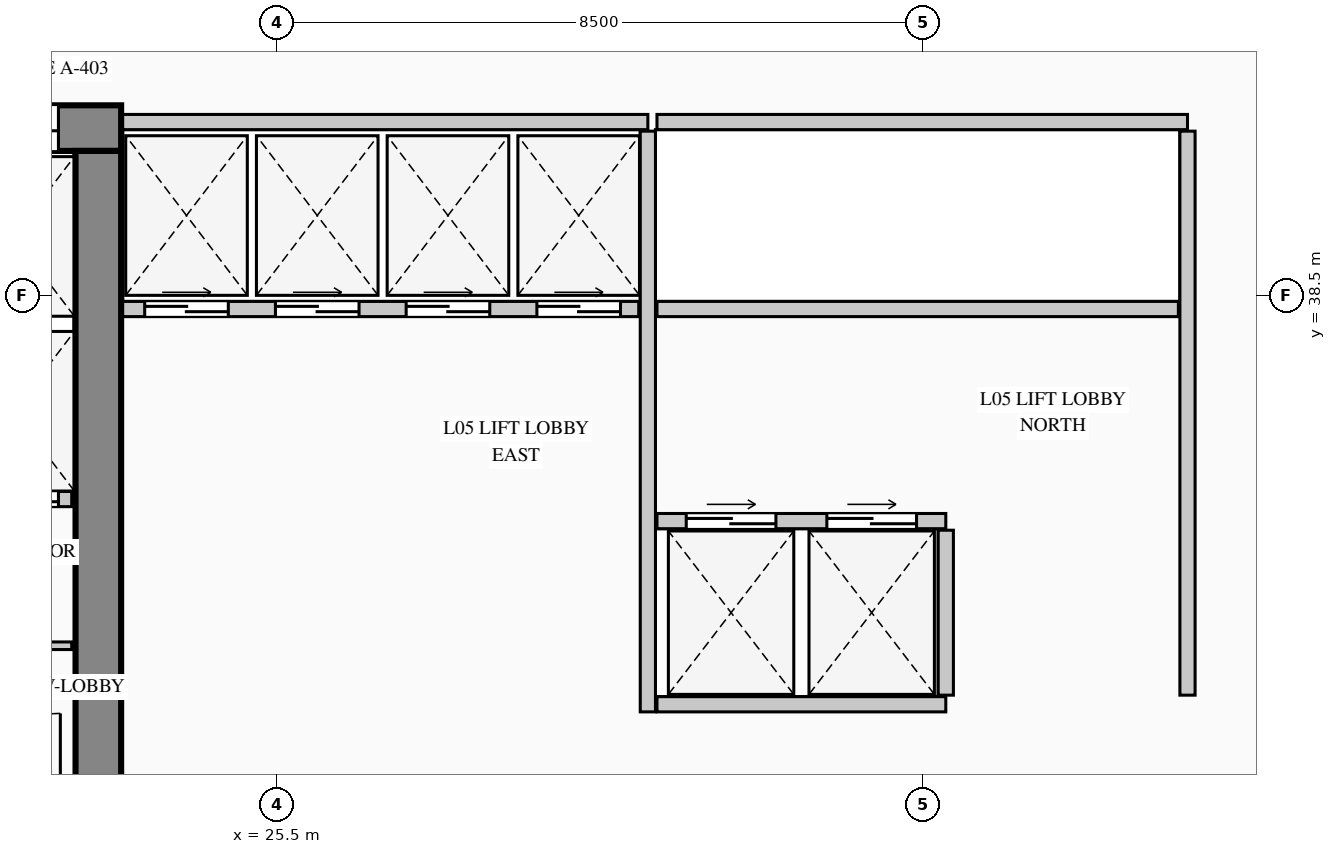
"""IFC4 building model, lengths in metres.
Left out: names, types, materials, properties, quantities, classifications, styles, units other than length and angle.
Written with IfcOpenShell. Run it as: python <this file> out.ifc"""

import sys

from ifc_helpers import new_model, si_unit, direction, frame, frame_2d, origin, place, context, subcontext, project, spatial, rectangle, extrude, element, fill, save


model = new_model("IFC4")
c1 = context("Model", 3, precision=1e-05, world=origin(), true_north=direction((0.0, 1.0)))
c2 = subcontext(c1, "Body", "Model", "MODEL_VIEW")
j1 = project(units=[si_unit("LENGTHUNIT", "METRE"), si_unit("PLANEANGLEUNIT", "RADIAN")], contexts=[c1])
p1 = place(None, origin())
s1 = spatial("IfcSite", under=j1, at=p1, CompositionType="ELEMENT")
p2 = place(p1, origin())
s2 = spatial("IfcBuilding", under=s1, at=p2, CompositionType="ELEMENT")
p3 = place(p2, frame((0.0, 0.0, 21.6)))
s3 = spatial("IfcBuildingStorey", under=s2, at=p3, CompositionType="ELEMENT", Elevation=21.6)
p4 = place(p3, frame((5.4, 40.7, 0.0), z_axis=(0.0, 0.0, 1.0), x_axis=(1.0, 0.0, 0.0)))
e1 = element("IfcWall", 1, at=p4, inside=s3, PredefinedType="SHEAR", context=c2, shape_type="SweptSolid", body=[
    extrude(rectangle(XDim=18.05, YDim=0.6, at=frame_2d((9.025, 0.0))), origin(), (0.0, 0.0, 1.0), 5.4),
])
p5 = place(p4, frame((16.045, 0.0, 0.0)))
e2 = element("IfcOpeningElement", 2, at=p5, cuts=e1, PredefinedType="OPENING", context=c2, shape_type="SweptSolid", body=[
    extrude(rectangle(XDim=1.18, YDim=2.25, at=frame_2d((0.59, 1.125))), frame((0.0, 0.31, 0.0), z_axis=(0.0, -1.0, 0.0), x_axis=(1.0, 0.0, 0.0)), (0.0, 0.0, 1.0), 0.62),
])
p6 = place(p3, frame((23.15, 32.1, 0.0), z_axis=(0.0, 0.0, 1.0), x_axis=(0.0, 1.0, 0.0)))
e3 = element("IfcWall", 3, at=p6, inside=s3, PredefinedType="SHEAR", context=c2, shape_type="SweptSolid", body=[
    extrude(rectangle(XDim=8.3, YDim=0.6, at=frame_2d((4.15, 0.0))), origin(), (0.0, 0.0, 1.0), 5.4),
])
p7 = place(p3, frame((21.38, 33.89, 0.0), z_axis=(0.0, 0.0, 1.0), x_axis=(1.0, 0.0, 0.0)))
e4 = element("IfcWall", 4, at=p7, inside=s3, PredefinedType="PARTITIONING", context=c2, shape_type="SweptSolid", body=[
    extrude(rectangle(XDim=1.42, YDim=0.1, at=frame_2d((0.71, 0.0))), origin(), (0.0, 0.0, 1.0), 5.0),
])
p8 = place(p7, frame((0.28, 0.0, 0.0)))
e5 = element("IfcOpeningElement", 5, at=p8, cuts=e4, PredefinedType="OPENING", context=c2, shape_type="SweptSolid", body=[
    extrude(rectangle(XDim=0.85, YDim=2.1, at=frame_2d((0.425, 1.05))), frame((0.0, 0.06, 0.0), z_axis=(0.0, -1.0, 0.0), x_axis=(1.0, 0.0, 0.0)), (0.0, 0.0, 1.0), 0.12),
])
p9 = place(p3, frame((21.3, 35.82, 0.0), z_axis=(0.0, 0.0, 1.0), x_axis=(1.0, 0.0, 0.0)))
e6 = element("IfcWall", 6, at=p9, inside=s3, PredefinedType="PARTITIONING", context=c2, shape_type="SweptSolid", body=[
    extrude(rectangle(XDim=1.5, YDim=0.2, at=frame_2d((0.75, 0.0))), origin(), (0.0, 0.0, 1.0), 5.0),
])
p10 = place(p9, frame((0.145, 0.0, 0.0)))
e7 = element("IfcOpeningElement", 7, at=p10, cuts=e6, PredefinedType="OPENING", context=c2, shape_type="SweptSolid", body=[
    extrude(rectangle(XDim=1.18, YDim=2.25, at=frame_2d((0.59, 1.125))), frame((0.0, 0.11, 0.0), z_axis=(0.0, -1.0, 0.0), x_axis=(1.0, 0.0, 0.0)), (0.0, 0.0, 1.0), 0.22),
])
p11 = place(p3, frame((23.47, 40.78, 0.0), z_axis=(0.0, 0.0, 1.0), x_axis=(1.0, 0.0, 0.0)))
e8 = element("IfcWall", 8, at=p11, inside=s3, PredefinedType="PARTITIONING", context=c2, shape_type="SweptSolid", body=[
    extrude(rectangle(XDim=6.91, YDim=0.2, at=frame_2d((3.455, 0.0))), origin(), (0.0, 0.0, 1.0), 5.0),
])
p12 = place(p3, frame((30.38, 33.02, 0.0), z_axis=(0.0, 0.0, 1.0), x_axis=(0.0, 1.0, 0.0)))
e9 = element("IfcWall", 9, at=p12, inside=s3, PredefinedType="PARTITIONING", context=c2, shape_type="SweptSolid", body=[
    extrude(rectangle(XDim=7.64, YDim=0.2, at=frame_2d((3.82, 0.0))), origin(), (0.0, 0.0, 1.0), 5.0),
])
p13 = place(p3, frame((23.47, 38.32, 0.0), z_axis=(0.0, 0.0, 1.0), x_axis=(1.0, 0.0, 0.0)))
e10 = element("IfcWall", 10, at=p13, inside=s3, PredefinedType="PARTITIONING", context=c2, shape_type="SweptSolid", body=[
    extrude(rectangle(XDim=6.79, YDim=0.2, at=frame_2d((3.395, 0.0))), origin(), (0.0, 0.0, 1.0), 5.0),
])
p14 = place(p13, frame((0.29, 0.0, 0.0)))
e11 = element("IfcOpeningElement", 11, at=p14, cuts=e10, PredefinedType="OPENING", context=c2, shape_type="SweptSolid", body=[
    extrude(rectangle(XDim=1.1, YDim=2.2, at=frame_2d((0.55, 1.1))), frame((0.0, 0.11, 0.0), z_axis=(0.0, -1.0, 0.0), x_axis=(1.0, 0.0, 0.0)), (0.0, 0.0, 1.0), 0.22),
])
p15 = place(p13, frame((2.01, 0.0, 0.0)))
e12 = element("IfcOpeningElement", 12, at=p15, cuts=e10, PredefinedType="OPENING", context=c2, shape_type="SweptSolid", body=[
    extrude(rectangle(XDim=1.1, YDim=2.2, at=frame_2d((0.55, 1.1))), frame((0.0, 0.11, 0.0), z_axis=(0.0, -1.0, 0.0), x_axis=(1.0, 0.0, 0.0)), (0.0, 0.0, 1.0), 0.22),
])
p16 = place(p13, frame((3.73, 0.0, 0.0)))
e13 = element("IfcOpeningElement", 13, at=p16, cuts=e10, PredefinedType="OPENING", context=c2, shape_type="SweptSolid", body=[
    extrude(rectangle(XDim=1.1, YDim=2.2, at=frame_2d((0.55, 1.1))), frame((0.0, 0.11, 0.0), z_axis=(0.0, -1.0, 0.0), x_axis=(1.0, 0.0, 0.0)), (0.0, 0.0, 1.0), 0.22),
])
p17 = place(p13, frame((5.45, 0.0, 0.0)))
e14 = element("IfcOpeningElement", 14, at=p17, cuts=e10, PredefinedType="OPENING", context=c2, shape_type="SweptSolid", body=[
    extrude(rectangle(XDim=1.1, YDim=2.2, at=frame_2d((0.55, 1.1))), frame((0.0, 0.11, 0.0), z_axis=(0.0, -1.0, 0.0), x_axis=(1.0, 0.0, 0.0)), (0.0, 0.0, 1.0), 0.22),
])
p18 = place(p3, frame((30.5, 40.78, 0.0), z_axis=(0.0, 0.0, 1.0), x_axis=(1.0, 0.0, 0.0)))
e15 = element("IfcWall", 15, at=p18, inside=s3, PredefinedType="PARTITIONING", context=c2, shape_type="SweptSolid", body=[
    extrude(rectangle(XDim=6.98, YDim=0.2, at=frame_2d((3.49, 0.0))), origin(), (0.0, 0.0, 1.0), 5.0),
])
p19 = place(p3, frame((37.48, 33.24, 0.0), z_axis=(0.0, 0.0, 1.0), x_axis=(0.0, 1.0, 0.0)))
e16 = element("IfcWall", 16, at=p19, inside=s3, PredefinedType="PARTITIONING", context=c2, shape_type="SweptSolid", body=[
    extrude(rectangle(XDim=7.42, YDim=0.2, at=frame_2d((3.71, 0.0))), origin(), (0.0, 0.0, 1.0), 5.0),
])
p20 = place(p3, frame((30.5, 38.32, 0.0), z_axis=(0.0, 0.0, 1.0), x_axis=(1.0, 0.0, 0.0)))
e17 = element("IfcWall", 17, at=p20, inside=s3, PredefinedType="PARTITIONING", context=c2, shape_type="SweptSolid", body=[
    extrude(rectangle(XDim=6.86, YDim=0.2, at=frame_2d((3.43, 0.0))), origin(), (0.0, 0.0, 1.0), 5.0),
])
p21 = place(p3, frame((30.5, 35.53, 0.0), z_axis=(0.0, 0.0, 1.0), x_axis=(1.0, 0.0, 0.0)))
e18 = element("IfcWall", 18, at=p21, inside=s3, PredefinedType="PARTITIONING", context=c2, shape_type="SweptSolid", body=[
    extrude(rectangle(XDim=3.8, YDim=0.2, at=frame_2d((1.9, 0.0))), origin(), (0.0, 0.0, 1.0), 5.0),
])
p22 = place(p21, frame((0.385, 0.0, 0.0)))
e19 = element("IfcOpeningElement", 19, at=p22, cuts=e18, PredefinedType="OPENING", context=c2, shape_type="SweptSolid", body=[
    extrude(rectangle(XDim=1.18, YDim=2.25, at=frame_2d((0.59, 1.125))), frame((0.0, 0.11, 0.0), z_axis=(0.0, -1.0, 0.0), x_axis=(1.0, 0.0, 0.0)), (0.0, 0.0, 1.0), 0.22),
])
p23 = place(p21, frame((2.235, 0.0, 0.0)))
e20 = element("IfcOpeningElement", 20, at=p23, cuts=e18, PredefinedType="OPENING", context=c2, shape_type="SweptSolid", body=[
    extrude(rectangle(XDim=1.18, YDim=2.25, at=frame_2d((0.59, 1.125))), frame((0.0, 0.11, 0.0), z_axis=(0.0, -1.0, 0.0), x_axis=(1.0, 0.0, 0.0)), (0.0, 0.0, 1.0), 0.22),
])
p24 = place(p3, frame((30.5, 33.12, 0.0), z_axis=(0.0, 0.0, 1.0), x_axis=(1.0, 0.0, 0.0)))
e21 = element("IfcWall", 21, at=p24, inside=s3, PredefinedType="PARTITIONING", context=c2, shape_type="SweptSolid", body=[
    extrude(rectangle(XDim=3.8, YDim=0.2, at=frame_2d((1.9, 0.0))), origin(), (0.0, 0.0, 1.0), 5.0),
])
p25 = place(p3, frame((34.3, 33.24, 0.0), z_axis=(0.0, 0.0, 1.0), x_axis=(0.0, 1.0, 0.0)))
e22 = element("IfcWall", 22, at=p25, inside=s3, PredefinedType="PARTITIONING", context=c2, shape_type="SweptSolid", body=[
    extrude(rectangle(XDim=2.17, YDim=0.2, at=frame_2d((1.085, 0.0))), origin(), (0.0, 0.0, 1.0), 5.0),
])
p26 = place(p5, origin())
e23 = element("IfcDoor", 23, at=p26, inside=s3, OperationType="DOUBLE_DOOR_SLIDING", PredefinedType="DOOR", context=c2, shape_type="SweptSolid", body=[
    extrude(rectangle(XDim=1.18, YDim=2.25, at=frame_2d((0.59, 1.125))), frame((0.0, 0.025, 0.0), z_axis=(0.0, -1.0, 0.0), x_axis=(1.0, 0.0, 0.0)), (0.0, 0.0, 1.0), 0.05),
])
fill(e2, e23)
p27 = place(p10, origin())
e24 = element("IfcDoor", 24, at=p27, inside=s3, OperationType="DOUBLE_DOOR_SLIDING", PredefinedType="DOOR", context=c2, shape_type="SweptSolid", body=[
    extrude(rectangle(XDim=1.18, YDim=2.25, at=frame_2d((0.59, 1.125))), frame((0.0, 0.025, 0.0), z_axis=(0.0, -1.0, 0.0), x_axis=(1.0, 0.0, 0.0)), (0.0, 0.0, 1.0), 0.05),
])
fill(e7, e24)
p28 = place(p14, origin())
e25 = element("IfcDoor", 25, at=p28, inside=s3, OperationType="DOUBLE_DOOR_SLIDING", PredefinedType="DOOR", context=c2, shape_type="SweptSolid", body=[
    extrude(rectangle(XDim=1.1, YDim=2.2, at=frame_2d((0.55, 1.1))), frame((0.0, 0.025, 0.0), z_axis=(0.0, -1.0, 0.0), x_axis=(1.0, 0.0, 0.0)), (0.0, 0.0, 1.0), 0.05),
])
fill(e11, e25)
p29 = place(p15, origin())
e26 = element("IfcDoor", 26, at=p29, inside=s3, OperationType="DOUBLE_DOOR_SLIDING", PredefinedType="DOOR", context=c2, shape_type="SweptSolid", body=[
    extrude(rectangle(XDim=1.1, YDim=2.2, at=frame_2d((0.55, 1.1))), frame((0.0, 0.025, 0.0), z_axis=(0.0, -1.0, 0.0), x_axis=(1.0, 0.0, 0.0)), (0.0, 0.0, 1.0), 0.05),
])
fill(e12, e26)
p30 = place(p16, origin())
e27 = element("IfcDoor", 27, at=p30, inside=s3, OperationType="DOUBLE_DOOR_SLIDING", PredefinedType="DOOR", context=c2, shape_type="SweptSolid", body=[
    extrude(rectangle(XDim=1.1, YDim=2.2, at=frame_2d((0.55, 1.1))), frame((0.0, 0.025, 0.0), z_axis=(0.0, -1.0, 0.0), x_axis=(1.0, 0.0, 0.0)), (0.0, 0.0, 1.0), 0.05),
])
fill(e13, e27)
p31 = place(p17, origin())
e28 = element("IfcDoor", 28, at=p31, inside=s3, OperationType="DOUBLE_DOOR_SLIDING", PredefinedType="DOOR", context=c2, shape_type="SweptSolid", body=[
    extrude(rectangle(XDim=1.1, YDim=2.2, at=frame_2d((0.55, 1.1))), frame((0.0, 0.025, 0.0), z_axis=(0.0, -1.0, 0.0), x_axis=(1.0, 0.0, 0.0)), (0.0, 0.0, 1.0), 0.05),
])
fill(e14, e28)
p32 = place(p22, origin())
e29 = element("IfcDoor", 29, at=p32, inside=s3, OperationType="DOUBLE_DOOR_SLIDING", PredefinedType="DOOR", context=c2, shape_type="SweptSolid", body=[
    extrude(rectangle(XDim=1.18, YDim=2.25, at=frame_2d((0.59, 1.125))), frame((0.0, 0.025, 0.0), z_axis=(0.0, -1.0, 0.0), x_axis=(1.0, 0.0, 0.0)), (0.0, 0.0, 1.0), 0.05),
])
fill(e19, e29)
p33 = place(p23, origin())
e30 = element("IfcDoor", 30, at=p33, inside=s3, OperationType="DOUBLE_DOOR_SLIDING", PredefinedType="DOOR", context=c2, shape_type="SweptSolid", body=[
    extrude(rectangle(XDim=1.18, YDim=2.25, at=frame_2d((0.59, 1.125))), frame((0.0, 0.025, 0.0), z_axis=(0.0, -1.0, 0.0), x_axis=(1.0, 0.0, 0.0)), (0.0, 0.0, 1.0), 0.05),
])
fill(e20, e30)
save(model, sys.argv[1])
